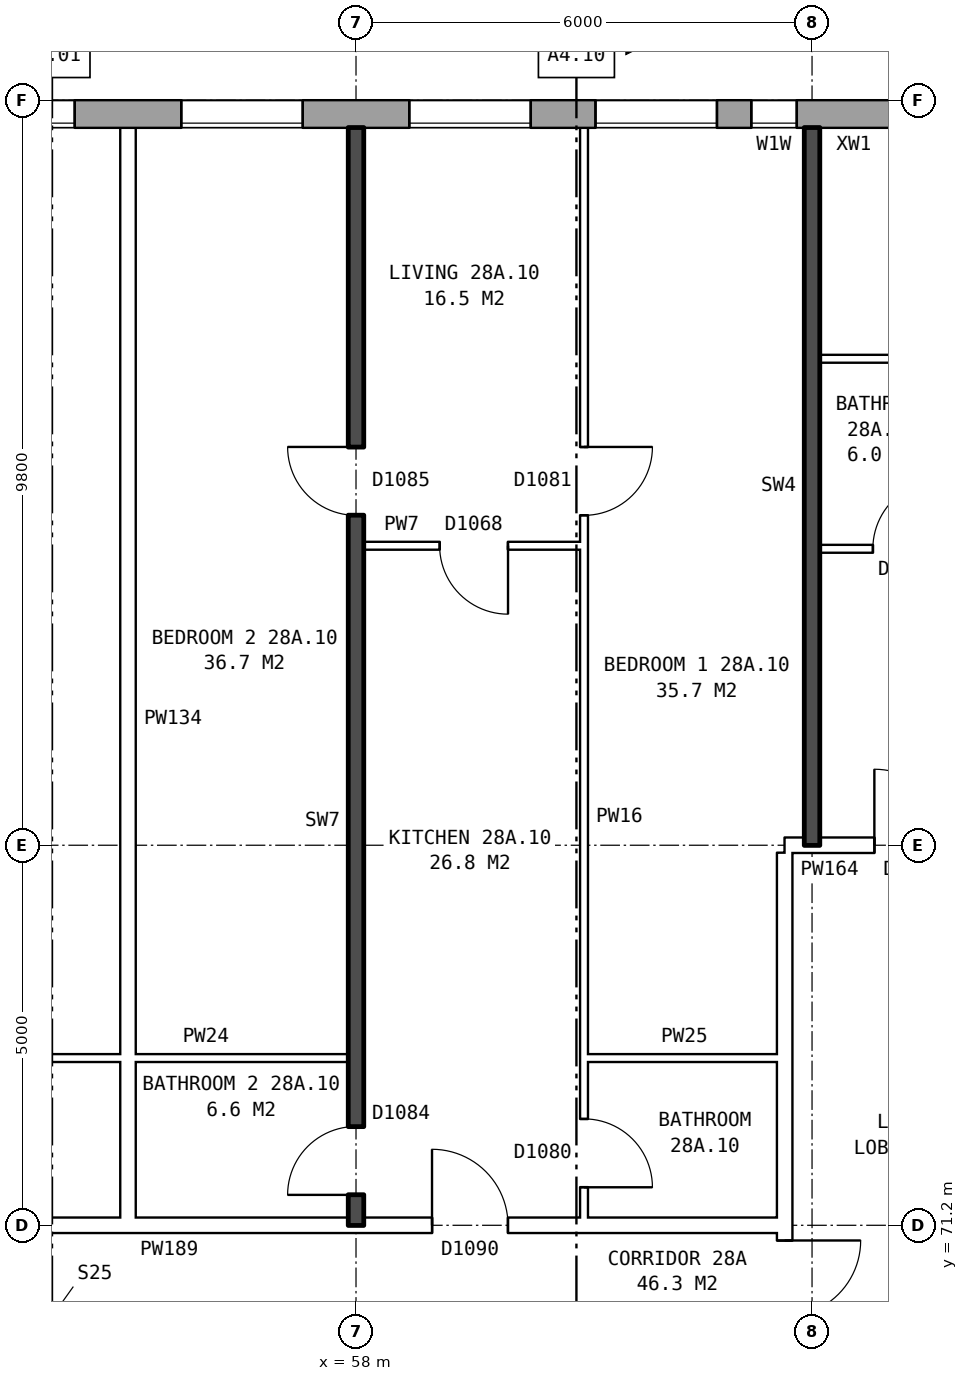
"""IFC4 building model, lengths in metres.
Left out: names, types, materials, properties, quantities, classifications, styles, units other than length and angle.
Written with IfcOpenShell. Run it as: python <this file> out.ifc"""

import sys

from ifc_helpers import new_model, si_unit, direction, frame, frame_2d, origin, place, context, subcontext, project, spatial, rectangle, extrude, element, fill, save


model = new_model("IFC4")
c1 = context("Model", 3, precision=1e-05, world=origin(), true_north=direction((0.0, 1.0)))
c2 = subcontext(c1, "Body", "Model", "MODEL_VIEW")
j1 = project(units=[si_unit("LENGTHUNIT", "METRE"), si_unit("PLANEANGLEUNIT", "RADIAN")], contexts=[c1])
p1 = place(None, origin())
s1 = spatial("IfcSite", under=j1, at=p1, CompositionType="ELEMENT")
p2 = place(p1, origin())
s2 = spatial("IfcBuilding", under=s1, at=p2, CompositionType="ELEMENT")
p3 = place(p2, frame((0.0, 0.0, 102.6)))
s3 = spatial("IfcBuildingStorey", under=s2, at=p3, CompositionType="ELEMENT", Elevation=102.6)
p4 = place(p3, frame((72.925, 85.82, 0.0), z_axis=(0.0, 0.0, 1.0), x_axis=(-1.0, 0.0, 0.0)))
e1 = element("IfcWall", 1, at=p4, inside=s3, PredefinedType="STANDARD", context=c2, shape_type="SweptSolid", body=[
    extrude(rectangle(XDim=44.851, YDim=0.36, at=frame_2d((22.425, 0.0))), origin(), (0.0, 0.0, 1.0), 2.85),
])
p5 = place(p4, frame((0.625, 0.0, 0.8)))
e2 = element("IfcOpeningElement", 2, at=p5, cuts=e1, PredefinedType="OPENING", context=c2, shape_type="SweptSolid", body=[
    extrude(rectangle(XDim=1.6, YDim=1.8, at=frame_2d((0.8, 0.9))), frame((0.0, 0.19, 0.0), z_axis=(0.0, -1.0, 0.0), x_axis=(1.0, 0.0, 0.0)), (0.0, 0.0, 1.0), 0.38),
])
p6 = place(p4, frame((3.625, 0.0, 0.8)))
e3 = element("IfcOpeningElement", 3, at=p6, cuts=e1, PredefinedType="OPENING", context=c2, shape_type="SweptSolid", body=[
    extrude(rectangle(XDim=1.6, YDim=1.8, at=frame_2d((0.8, 0.9))), frame((0.0, 0.19, 0.0), z_axis=(0.0, -1.0, 0.0), x_axis=(1.0, 0.0, 0.0)), (0.0, 0.0, 1.0), 0.38),
])
p7 = place(p4, frame((5.525, 0.0, 0.8)))
e4 = element("IfcOpeningElement", 4, at=p7, cuts=e1, PredefinedType="OPENING", context=c2, shape_type="SweptSolid", body=[
    extrude(rectangle(XDim=0.8, YDim=1.8, at=frame_2d((0.4, 0.9))), frame((0.0, 0.19, 0.0), z_axis=(0.0, -1.0, 0.0), x_axis=(1.0, 0.0, 0.0)), (0.0, 0.0, 1.0), 0.38),
])
p8 = place(p4, frame((9.125, 0.0, 0.8)))
e5 = element("IfcOpeningElement", 5, at=p8, cuts=e1, PredefinedType="OPENING", context=c2, shape_type="SweptSolid", body=[
    extrude(rectangle(XDim=0.6, YDim=0.9, at=frame_2d((0.3, 0.45))), frame((0.0, 0.19, 0.0), z_axis=(0.0, -1.0, 0.0), x_axis=(1.0, 0.0, 0.0)), (0.0, 0.0, 1.0), 0.38),
])
p9 = place(p4, frame((12.625, 0.0, 0.8)))
e6 = element("IfcOpeningElement", 6, at=p9, cuts=e1, PredefinedType="OPENING", context=c2, shape_type="SweptSolid", body=[
    extrude(rectangle(XDim=1.6, YDim=1.8, at=frame_2d((0.8, 0.9))), frame((0.0, 0.19, 0.0), z_axis=(0.0, -1.0, 0.0), x_axis=(1.0, 0.0, 0.0)), (0.0, 0.0, 1.0), 0.38),
])
p10 = place(p4, frame((15.625, 0.0, 0.8)))
e7 = element("IfcOpeningElement", 7, at=p10, cuts=e1, PredefinedType="OPENING", context=c2, shape_type="SweptSolid", body=[
    extrude(rectangle(XDim=1.6, YDim=1.8, at=frame_2d((0.8, 0.9))), frame((0.0, 0.19, 0.0), z_axis=(0.0, -1.0, 0.0), x_axis=(1.0, 0.0, 0.0)), (0.0, 0.0, 1.0), 0.38),
])
p11 = place(p4, frame((18.625, 0.0, 0.8)))
e8 = element("IfcOpeningElement", 8, at=p11, cuts=e1, PredefinedType="OPENING", context=c2, shape_type="SweptSolid", body=[
    extrude(rectangle(XDim=1.6, YDim=1.8, at=frame_2d((0.8, 0.9))), frame((0.0, 0.19, 0.0), z_axis=(0.0, -1.0, 0.0), x_axis=(1.0, 0.0, 0.0)), (0.0, 0.0, 1.0), 0.38),
])
p12 = place(p4, frame((21.625, 0.0, 0.8)))
e9 = element("IfcOpeningElement", 9, at=p12, cuts=e1, PredefinedType="OPENING", context=c2, shape_type="SweptSolid", body=[
    extrude(rectangle(XDim=1.6, YDim=1.8, at=frame_2d((0.8, 0.9))), frame((0.0, 0.19, 0.0), z_axis=(0.0, -1.0, 0.0), x_axis=(1.0, 0.0, 0.0)), (0.0, 0.0, 1.0), 0.38),
])
p13 = place(p4, frame((24.625, 0.0, 0.8)))
e10 = element("IfcOpeningElement", 10, at=p13, cuts=e1, PredefinedType="OPENING", context=c2, shape_type="SweptSolid", body=[
    extrude(rectangle(XDim=1.6, YDim=1.8, at=frame_2d((0.8, 0.9))), frame((0.0, 0.19, 0.0), z_axis=(0.0, -1.0, 0.0), x_axis=(1.0, 0.0, 0.0)), (0.0, 0.0, 1.0), 0.38),
])
p14 = place(p4, frame((27.625, 0.0, 0.8)))
e11 = element("IfcOpeningElement", 11, at=p14, cuts=e1, PredefinedType="OPENING", context=c2, shape_type="SweptSolid", body=[
    extrude(rectangle(XDim=1.6, YDim=1.8, at=frame_2d((0.8, 0.9))), frame((0.0, 0.19, 0.0), z_axis=(0.0, -1.0, 0.0), x_axis=(1.0, 0.0, 0.0)), (0.0, 0.0, 1.0), 0.38),
])
p15 = place(p4, frame((30.625, 0.0, 0.8)))
e12 = element("IfcOpeningElement", 12, at=p15, cuts=e1, PredefinedType="OPENING", context=c2, shape_type="SweptSolid", body=[
    extrude(rectangle(XDim=1.6, YDim=1.8, at=frame_2d((0.8, 0.9))), frame((0.0, 0.19, 0.0), z_axis=(0.0, -1.0, 0.0), x_axis=(1.0, 0.0, 0.0)), (0.0, 0.0, 1.0), 0.38),
])
p16 = place(p4, frame((33.125, 0.0, 0.8)))
e13 = element("IfcOpeningElement", 13, at=p16, cuts=e1, PredefinedType="OPENING", context=c2, shape_type="SweptSolid", body=[
    extrude(rectangle(XDim=1.4, YDim=1.8, at=frame_2d((0.7, 0.9))), frame((0.0, 0.19, 0.0), z_axis=(0.0, -1.0, 0.0), x_axis=(1.0, 0.0, 0.0)), (0.0, 0.0, 1.0), 0.38),
])
p17 = place(p4, frame((34.825, 0.0, 0.8)))
e14 = element("IfcOpeningElement", 14, at=p17, cuts=e1, PredefinedType="OPENING", context=c2, shape_type="SweptSolid", body=[
    extrude(rectangle(XDim=1.0, YDim=0.9, at=frame_2d((0.5, 0.45))), frame((0.0, 0.19, 0.0), z_axis=(0.0, -1.0, 0.0), x_axis=(1.0, 0.0, 0.0)), (0.0, 0.0, 1.0), 0.38),
])
p18 = place(p4, frame((39.625, 0.0, 0.8)))
e15 = element("IfcOpeningElement", 15, at=p18, cuts=e1, PredefinedType="OPENING", context=c2, shape_type="SweptSolid", body=[
    extrude(rectangle(XDim=1.6, YDim=1.8, at=frame_2d((0.8, 0.9))), frame((0.0, 0.19, 0.0), z_axis=(0.0, -1.0, 0.0), x_axis=(1.0, 0.0, 0.0)), (0.0, 0.0, 1.0), 0.38),
])
p19 = place(p4, frame((42.625, 0.0, 0.8)))
e16 = element("IfcOpeningElement", 16, at=p19, cuts=e1, PredefinedType="OPENING", context=c2, shape_type="SweptSolid", body=[
    extrude(rectangle(XDim=1.6, YDim=1.8, at=frame_2d((0.8, 0.9))), frame((0.0, 0.19, 0.0), z_axis=(0.0, -1.0, 0.0), x_axis=(1.0, 0.0, 0.0)), (0.0, 0.0, 1.0), 0.38),
])
p20 = place(p4, frame((6.625, 0.0, 1.7)))
e17 = element("IfcOpeningElement", 17, at=p20, cuts=e1, PredefinedType="OPENING", context=c2, shape_type="SweptSolid", body=[
    extrude(rectangle(XDim=1.0, YDim=0.9, at=frame_2d((0.5, 0.45))), frame((0.0, 0.19, 0.0), z_axis=(0.0, -1.0, 0.0), x_axis=(1.0, 0.0, 0.0)), (0.0, 0.0, 1.0), 0.38),
])
p21 = place(p4, frame((10.175, 0.0, 0.8)))
e18 = element("IfcOpeningElement", 18, at=p21, cuts=e1, PredefinedType="OPENING", context=c2, shape_type="SweptSolid", body=[
    extrude(rectangle(XDim=1.6, YDim=1.8, at=frame_2d((0.8, 0.9))), frame((0.0, 0.19, 0.0), z_axis=(0.0, -1.0, 0.0), x_axis=(1.0, 0.0, 0.0)), (0.0, 0.0, 1.0), 0.38),
])
p22 = place(p4, frame((37.175, 0.0, 1.7)))
e19 = element("IfcOpeningElement", 19, at=p22, cuts=e1, PredefinedType="OPENING", context=c2, shape_type="SweptSolid", body=[
    extrude(rectangle(XDim=0.6, YDim=0.9, at=frame_2d((0.3, 0.45))), frame((0.0, 0.19, 0.0), z_axis=(0.0, -1.0, 0.0), x_axis=(1.0, 0.0, 0.0)), (0.0, 0.0, 1.0), 0.38),
])
p23 = place(p4, frame((38.075, 0.0, 1.1)))
e20 = element("IfcOpeningElement", 20, at=p23, cuts=e1, PredefinedType="OPENING", context=c2, shape_type="SweptSolid", body=[
    extrude(rectangle(XDim=0.6, YDim=1.5, at=frame_2d((0.3, 0.75))), frame((0.0, 0.19, 0.0), z_axis=(0.0, -1.0, 0.0), x_axis=(1.0, 0.0, 0.0)), (0.0, 0.0, 1.0), 0.38),
])
p24 = place(p3, frame((63.64, 63.9, 0.0), z_axis=(0.0, 0.0, 1.0), x_axis=(0.0, 1.0, 0.0)))
e21 = element("IfcWall", 21, at=p24, inside=s3, PredefinedType="PARTITIONING", context=c2, shape_type="SweptSolid", body=[
    extrude(rectangle(XDim=12.2, YDim=0.2, at=frame_2d((6.1, 0.0))), origin(), (0.0, 0.0, 1.0), 2.85),
])
p25 = place(p24, frame((5.1, 0.0, 0.0)))
e22 = element("IfcOpeningElement", 22, at=p25, cuts=e21, PredefinedType="OPENING", context=c2, shape_type="SweptSolid", body=[
    extrude(rectangle(XDim=2.0, YDim=2.1, at=frame_2d((1.0, 1.05))), frame((0.0, 0.11, 0.0), z_axis=(0.0, -1.0, 0.0), x_axis=(1.0, 0.0, 0.0)), (0.0, 0.0, 1.0), 0.22),
])
p26 = place(p3, frame((44.36, 71.2, 0.0), z_axis=(0.0, 0.0, 1.0), x_axis=(1.0, 0.0, 0.0)))
e23 = element("IfcWall", 23, at=p26, inside=s3, PredefinedType="PARTITIONING", context=c2, shape_type="SweptSolid", body=[
    extrude(rectangle(XDim=19.28, YDim=0.2, at=frame_2d((9.64, 0.0))), origin(), (0.0, 0.0, 1.0), 2.85),
])
p27 = place(p26, frame((14.64, 0.0, 0.0)))
e24 = element("IfcOpeningElement", 24, at=p27, cuts=e23, PredefinedType="OPENING", context=c2, shape_type="SweptSolid", body=[
    extrude(rectangle(XDim=1.0, YDim=2.1, at=frame_2d((0.5, 1.05))), frame((0.0, 0.11, 0.0), z_axis=(0.0, -1.0, 0.0), x_axis=(1.0, 0.0, 0.0)), (0.0, 0.0, 1.0), 0.22),
])
p28 = place(p26, frame((5.64, 0.0, 0.0)))
e25 = element("IfcOpeningElement", 25, at=p28, cuts=e23, PredefinedType="OPENING", context=c2, shape_type="SweptSolid", body=[
    extrude(rectangle(XDim=1.0, YDim=2.1, at=frame_2d((0.5, 1.05))), frame((0.0, 0.11, 0.0), z_axis=(0.0, -1.0, 0.0), x_axis=(1.0, 0.0, 0.0)), (0.0, 0.0, 1.0), 0.22),
])
p29 = place(p3, frame((52.1, 73.4, 0.0), z_axis=(0.0, 0.0, 1.0), x_axis=(1.0, 0.0, 0.0)))
e26 = element("IfcWall", 26, at=p29, inside=s3, PredefinedType="PARTITIONING", context=c2, shape_type="SweptSolid", body=[
    extrude(rectangle(XDim=5.8, YDim=0.1, at=frame_2d((2.9, 0.0))), origin(), (0.0, 0.0, 1.0), 2.85),
])
p30 = place(p3, frame((61.0, 73.4, 0.0), z_axis=(0.0, 0.0, 1.0), x_axis=(1.0, 0.0, 0.0)))
e27 = element("IfcWall", 27, at=p30, inside=s3, PredefinedType="PARTITIONING", context=c2, shape_type="SweptSolid", body=[
    extrude(rectangle(XDim=2.64, YDim=0.1, at=frame_2d((1.32, 0.0))), origin(), (0.0, 0.0, 1.0), 2.85),
])
p31 = place(p3, frame((63.64, 76.2, 0.0), z_axis=(0.0, 0.0, 1.0), x_axis=(1.0, 0.0, 0.0)))
e28 = element("IfcWall", 28, at=p31, inside=s3, PredefinedType="PARTITIONING", context=c2, shape_type="SweptSolid", body=[
    extrude(rectangle(XDim=3.0, YDim=0.2, at=frame_2d((1.5, 0.0))), origin(), (0.0, 0.0, 1.0), 2.85),
])
p32 = place(p31, frame((1.18, 0.0, 0.0)))
e29 = element("IfcOpeningElement", 29, at=p32, cuts=e28, PredefinedType="OPENING", context=c2, shape_type="SweptSolid", body=[
    extrude(rectangle(XDim=1.0, YDim=2.1, at=frame_2d((0.5, 1.05))), frame((0.0, 0.11, 0.0), z_axis=(0.0, -1.0, 0.0), x_axis=(1.0, 0.0, 0.0)), (0.0, 0.0, 1.0), 0.22),
])
p33 = place(p3, frame((64.1, 80.1, 0.0), z_axis=(0.0, 0.0, 1.0), x_axis=(1.0, 0.0, 0.0)))
e30 = element("IfcWall", 30, at=p33, inside=s3, PredefinedType="PARTITIONING", context=c2, shape_type="SweptSolid", body=[
    extrude(rectangle(XDim=5.8, YDim=0.1, at=frame_2d((2.9, 0.0))), origin(), (0.0, 0.0, 1.0), 2.85),
])
p34 = place(p33, frame((3.6, 0.0, 0.0)))
e31 = element("IfcOpeningElement", 31, at=p34, cuts=e30, PredefinedType="OPENING", context=c2, shape_type="SweptSolid", body=[
    extrude(rectangle(XDim=0.9, YDim=2.1, at=frame_2d((0.45, 1.05))), frame((0.0, 0.06, 0.0), z_axis=(0.0, -1.0, 0.0), x_axis=(1.0, 0.0, 0.0)), (0.0, 0.0, 1.0), 0.12),
])
p35 = place(p33, frame((0.7, 0.0, 0.0)))
e32 = element("IfcOpeningElement", 32, at=p35, cuts=e30, PredefinedType="OPENING", context=c2, shape_type="SweptSolid", body=[
    extrude(rectangle(XDim=0.9, YDim=2.1, at=frame_2d((0.45, 1.05))), frame((0.0, 0.06, 0.0), z_axis=(0.0, -1.0, 0.0), x_axis=(1.0, 0.0, 0.0)), (0.0, 0.0, 1.0), 0.12),
])
p36 = place(p3, frame((58.1, 80.14, 0.0), z_axis=(0.0, 0.0, 1.0), x_axis=(1.0, 0.0, 0.0)))
e33 = element("IfcWall", 33, at=p36, inside=s3, PredefinedType="PARTITIONING", context=c2, shape_type="SweptSolid", body=[
    extrude(rectangle(XDim=2.9, YDim=0.1, at=frame_2d((1.45, 0.0))), origin(), (0.0, 0.0, 1.0), 2.85),
])
p37 = place(p36, frame((1.0, 0.0, 0.0)))
e34 = element("IfcOpeningElement", 34, at=p37, cuts=e33, PredefinedType="OPENING", context=c2, shape_type="SweptSolid", body=[
    extrude(rectangle(XDim=0.9, YDim=2.1, at=frame_2d((0.45, 1.05))), frame((0.0, 0.06, 0.0), z_axis=(0.0, -1.0, 0.0), x_axis=(1.0, 0.0, 0.0)), (0.0, 0.0, 1.0), 0.12),
])
p38 = place(p3, frame((64.1, 82.6, 0.0), z_axis=(0.0, 0.0, 1.0), x_axis=(1.0, 0.0, 0.0)))
e35 = element("IfcWall", 35, at=p38, inside=s3, PredefinedType="PARTITIONING", context=c2, shape_type="SweptSolid", body=[
    extrude(rectangle(XDim=2.3, YDim=0.1, at=frame_2d((1.15, 0.0))), origin(), (0.0, 0.0, 1.0), 2.85),
])
p39 = place(p3, frame((55.0, 71.3, 0.0), z_axis=(0.0, 0.0, 1.0), x_axis=(0.0, 1.0, 0.0)))
e36 = element("IfcWall", 36, at=p39, inside=s3, PredefinedType="PARTITIONING", context=c2, shape_type="SweptSolid", body=[
    extrude(rectangle(XDim=14.34, YDim=0.2, at=frame_2d((7.17, 0.0))), origin(), (0.0, 0.0, 1.0), 2.85),
])
p40 = place(p3, frame((58.0, 71.2, 0.0), z_axis=(0.0, 0.0, 1.0), x_axis=(0.0, 1.0, 0.0)))
e37 = element("IfcWall", 37, at=p40, inside=s3, PredefinedType="SOLIDWALL", context=c2, shape_type="SweptSolid", body=[
    extrude(rectangle(XDim=14.44, YDim=0.2, at=frame_2d((7.22, 0.0))), origin(), (0.0, 0.0, 1.0), 2.85),
])
p41 = place(p40, frame((9.34, 0.0, 0.0)))
e38 = element("IfcOpeningElement", 38, at=p41, cuts=e37, PredefinedType="OPENING", context=c2, shape_type="SweptSolid", body=[
    extrude(rectangle(XDim=0.9, YDim=2.1, at=frame_2d((0.45, 1.05))), frame((0.0, 0.11, 0.0), z_axis=(0.0, -1.0, 0.0), x_axis=(1.0, 0.0, 0.0)), (0.0, 0.0, 1.0), 0.22),
])
p42 = place(p40, frame((0.4, 0.0, 0.0)))
e39 = element("IfcOpeningElement", 39, at=p42, cuts=e37, PredefinedType="OPENING", context=c2, shape_type="SweptSolid", body=[
    extrude(rectangle(XDim=0.9, YDim=2.1, at=frame_2d((0.45, 1.05))), frame((0.0, 0.11, 0.0), z_axis=(0.0, -1.0, 0.0), x_axis=(1.0, 0.0, 0.0)), (0.0, 0.0, 1.0), 0.22),
])
p43 = place(p3, frame((61.0, 71.3, 0.0), z_axis=(0.0, 0.0, 1.0), x_axis=(0.0, 1.0, 0.0)))
e40 = element("IfcWall", 40, at=p43, inside=s3, PredefinedType="PARTITIONING", context=c2, shape_type="SweptSolid", body=[
    extrude(rectangle(XDim=14.34, YDim=0.1, at=frame_2d((7.17, 0.0))), origin(), (0.0, 0.0, 1.0), 2.85),
])
p44 = place(p43, frame((9.24, 0.0, 0.0)))
e41 = element("IfcOpeningElement", 41, at=p44, cuts=e40, PredefinedType="OPENING", context=c2, shape_type="SweptSolid", body=[
    extrude(rectangle(XDim=0.9, YDim=2.1, at=frame_2d((0.45, 1.05))), frame((0.0, 0.06, 0.0), z_axis=(0.0, -1.0, 0.0), x_axis=(1.0, 0.0, 0.0)), (0.0, 0.0, 1.0), 0.12),
])
p45 = place(p43, frame((0.4, 0.0, 0.0)))
e42 = element("IfcOpeningElement", 42, at=p45, cuts=e40, PredefinedType="OPENING", context=c2, shape_type="SweptSolid", body=[
    extrude(rectangle(XDim=0.9, YDim=2.1, at=frame_2d((0.45, 1.05))), frame((0.0, 0.06, 0.0), z_axis=(0.0, -1.0, 0.0), x_axis=(1.0, 0.0, 0.0)), (0.0, 0.0, 1.0), 0.12),
])
p46 = place(p3, frame((64.0, 76.2, 0.0), z_axis=(0.0, 0.0, 1.0), x_axis=(0.0, 1.0, 0.0)))
e43 = element("IfcWall", 43, at=p46, inside=s3, PredefinedType="SOLIDWALL", context=c2, shape_type="SweptSolid", body=[
    extrude(rectangle(XDim=9.44, YDim=0.2, at=frame_2d((4.72, 0.0))), origin(), (0.0, 0.0, 1.0), 2.85),
])
p47 = place(p8, origin())
e44 = element("IfcWindow", 44, at=p47, inside=s3, PartitioningType="SINGLE_PANEL", PredefinedType="WINDOW", context=c2, shape_type="SweptSolid", body=[
    extrude(rectangle(XDim=0.6, YDim=0.9, at=frame_2d((0.3, 0.45))), frame((0.0, 0.15, 0.0), z_axis=(0.0, -1.0, 0.0), x_axis=(1.0, 0.0, 0.0)), (0.0, 0.0, 1.0), 0.06),
])
fill(e5, e44)
p48 = place(p9, origin())
e45 = element("IfcWindow", 45, at=p48, inside=s3, PartitioningType="SINGLE_PANEL", PredefinedType="WINDOW", context=c2, shape_type="SweptSolid", body=[
    extrude(rectangle(XDim=1.6, YDim=1.8, at=frame_2d((0.8, 0.9))), frame((0.0, 0.15, 0.0), z_axis=(0.0, -1.0, 0.0), x_axis=(1.0, 0.0, 0.0)), (0.0, 0.0, 1.0), 0.06),
])
fill(e6, e45)
p49 = place(p10, origin())
e46 = element("IfcWindow", 46, at=p49, inside=s3, PartitioningType="SINGLE_PANEL", PredefinedType="WINDOW", context=c2, shape_type="SweptSolid", body=[
    extrude(rectangle(XDim=1.6, YDim=1.8, at=frame_2d((0.8, 0.9))), frame((0.0, 0.15, 0.0), z_axis=(0.0, -1.0, 0.0), x_axis=(1.0, 0.0, 0.0)), (0.0, 0.0, 1.0), 0.06),
])
fill(e7, e46)
p50 = place(p11, origin())
e47 = element("IfcWindow", 47, at=p50, inside=s3, PartitioningType="SINGLE_PANEL", PredefinedType="WINDOW", context=c2, shape_type="SweptSolid", body=[
    extrude(rectangle(XDim=1.6, YDim=1.8, at=frame_2d((0.8, 0.9))), frame((0.0, 0.15, 0.0), z_axis=(0.0, -1.0, 0.0), x_axis=(1.0, 0.0, 0.0)), (0.0, 0.0, 1.0), 0.06),
])
fill(e8, e47)
p51 = place(p25, frame((2.0, 0.0, 0.0), z_axis=(0.0, 0.0, 1.0), x_axis=(-1.0, 0.0, 0.0)))
e48 = element("IfcDoor", 48, at=p51, inside=s3, OperationType="DOUBLE_DOOR_SINGLE_SWING", PredefinedType="DOOR", context=c2, shape_type="SweptSolid", body=[
    extrude(rectangle(XDim=2.0, YDim=2.1, at=frame_2d((1.0, 1.05))), frame((0.0, 0.025, 0.0), z_axis=(0.0, -1.0, 0.0), x_axis=(1.0, 0.0, 0.0)), (0.0, 0.0, 1.0), 0.05),
])
fill(e22, e48)
p52 = place(p32, origin())
e49 = element("IfcDoor", 49, at=p52, inside=s3, OperationType="SINGLE_SWING_LEFT", PredefinedType="DOOR", context=c2, shape_type="SweptSolid", body=[
    extrude(rectangle(XDim=1.0, YDim=2.1, at=frame_2d((0.5, 1.05))), frame((0.0, 0.025, 0.0), z_axis=(0.0, -1.0, 0.0), x_axis=(1.0, 0.0, 0.0)), (0.0, 0.0, 1.0), 0.05),
])
fill(e29, e49)
p53 = place(p35, origin())
e50 = element("IfcDoor", 50, at=p53, inside=s3, OperationType="SINGLE_SWING_RIGHT", PredefinedType="DOOR", context=c2, shape_type="SweptSolid", body=[
    extrude(rectangle(XDim=0.9, YDim=2.1, at=frame_2d((0.45, 1.05))), frame((0.0, 0.025, 0.0), z_axis=(0.0, -1.0, 0.0), x_axis=(1.0, 0.0, 0.0)), (0.0, 0.0, 1.0), 0.05),
])
fill(e32, e50)
p54 = place(p44, frame((0.9, 0.0, 0.0), z_axis=(0.0, 0.0, 1.0), x_axis=(-1.0, 0.0, 0.0)))
e51 = element("IfcDoor", 51, at=p54, inside=s3, OperationType="SINGLE_SWING_LEFT", PredefinedType="DOOR", context=c2, shape_type="SweptSolid", body=[
    extrude(rectangle(XDim=0.9, YDim=2.1, at=frame_2d((0.45, 1.05))), frame((0.0, 0.025, 0.0), z_axis=(0.0, -1.0, 0.0), x_axis=(1.0, 0.0, 0.0)), (0.0, 0.0, 1.0), 0.05),
])
fill(e41, e51)
p55 = place(p41, origin())
e52 = element("IfcDoor", 52, at=p55, inside=s3, OperationType="SINGLE_SWING_RIGHT", PredefinedType="DOOR", context=c2, shape_type="SweptSolid", body=[
    extrude(rectangle(XDim=0.9, YDim=2.1, at=frame_2d((0.45, 1.05))), frame((0.0, 0.025, 0.0), z_axis=(0.0, -1.0, 0.0), x_axis=(1.0, 0.0, 0.0)), (0.0, 0.0, 1.0), 0.05),
])
fill(e38, e52)
p56 = place(p27, origin())
e53 = element("IfcDoor", 53, at=p56, inside=s3, OperationType="SINGLE_SWING_LEFT", PredefinedType="DOOR", context=c2, shape_type="SweptSolid", body=[
    extrude(rectangle(XDim=1.0, YDim=2.1, at=frame_2d((0.5, 1.05))), frame((0.0, 0.025, 0.0), z_axis=(0.0, -1.0, 0.0), x_axis=(1.0, 0.0, 0.0)), (0.0, 0.0, 1.0), 0.05),
])
fill(e24, e53)
p57 = place(p37, frame((0.9, 0.0, 0.0), z_axis=(0.0, 0.0, 1.0), x_axis=(-1.0, 0.0, 0.0)))
e54 = element("IfcDoor", 54, at=p57, inside=s3, OperationType="SINGLE_SWING_LEFT", PredefinedType="DOOR", context=c2, shape_type="SweptSolid", body=[
    extrude(rectangle(XDim=0.9, YDim=2.1, at=frame_2d((0.45, 1.05))), frame((0.0, 0.025, 0.0), z_axis=(0.0, -1.0, 0.0), x_axis=(1.0, 0.0, 0.0)), (0.0, 0.0, 1.0), 0.05),
])
fill(e34, e54)
p58 = place(p45, frame((0.9, 0.0, 0.0), z_axis=(0.0, 0.0, 1.0), x_axis=(-1.0, 0.0, 0.0)))
e55 = element("IfcDoor", 55, at=p58, inside=s3, OperationType="SINGLE_SWING_RIGHT", PredefinedType="DOOR", context=c2, shape_type="SweptSolid", body=[
    extrude(rectangle(XDim=0.9, YDim=2.1, at=frame_2d((0.45, 1.05))), frame((0.0, 0.025, 0.0), z_axis=(0.0, -1.0, 0.0), x_axis=(1.0, 0.0, 0.0)), (0.0, 0.0, 1.0), 0.05),
])
fill(e42, e55)
p59 = place(p42, origin())
e56 = element("IfcDoor", 56, at=p59, inside=s3, OperationType="SINGLE_SWING_LEFT", PredefinedType="DOOR", context=c2, shape_type="SweptSolid", body=[
    extrude(rectangle(XDim=0.9, YDim=2.1, at=frame_2d((0.45, 1.05))), frame((0.0, 0.025, 0.0), z_axis=(0.0, -1.0, 0.0), x_axis=(1.0, 0.0, 0.0)), (0.0, 0.0, 1.0), 0.05),
])
fill(e39, e56)
p60 = place(p21, origin())
e57 = element("IfcWindow", 57, at=p60, inside=s3, PartitioningType="SINGLE_PANEL", PredefinedType="WINDOW", context=c2, shape_type="SweptSolid", body=[
    extrude(rectangle(XDim=1.6, YDim=1.8, at=frame_2d((0.8, 0.9))), frame((0.0, 0.15, 0.0), z_axis=(0.0, -1.0, 0.0), x_axis=(1.0, 0.0, 0.0)), (0.0, 0.0, 1.0), 0.06),
])
fill(e18, e57)
save(model, sys.argv[1])
